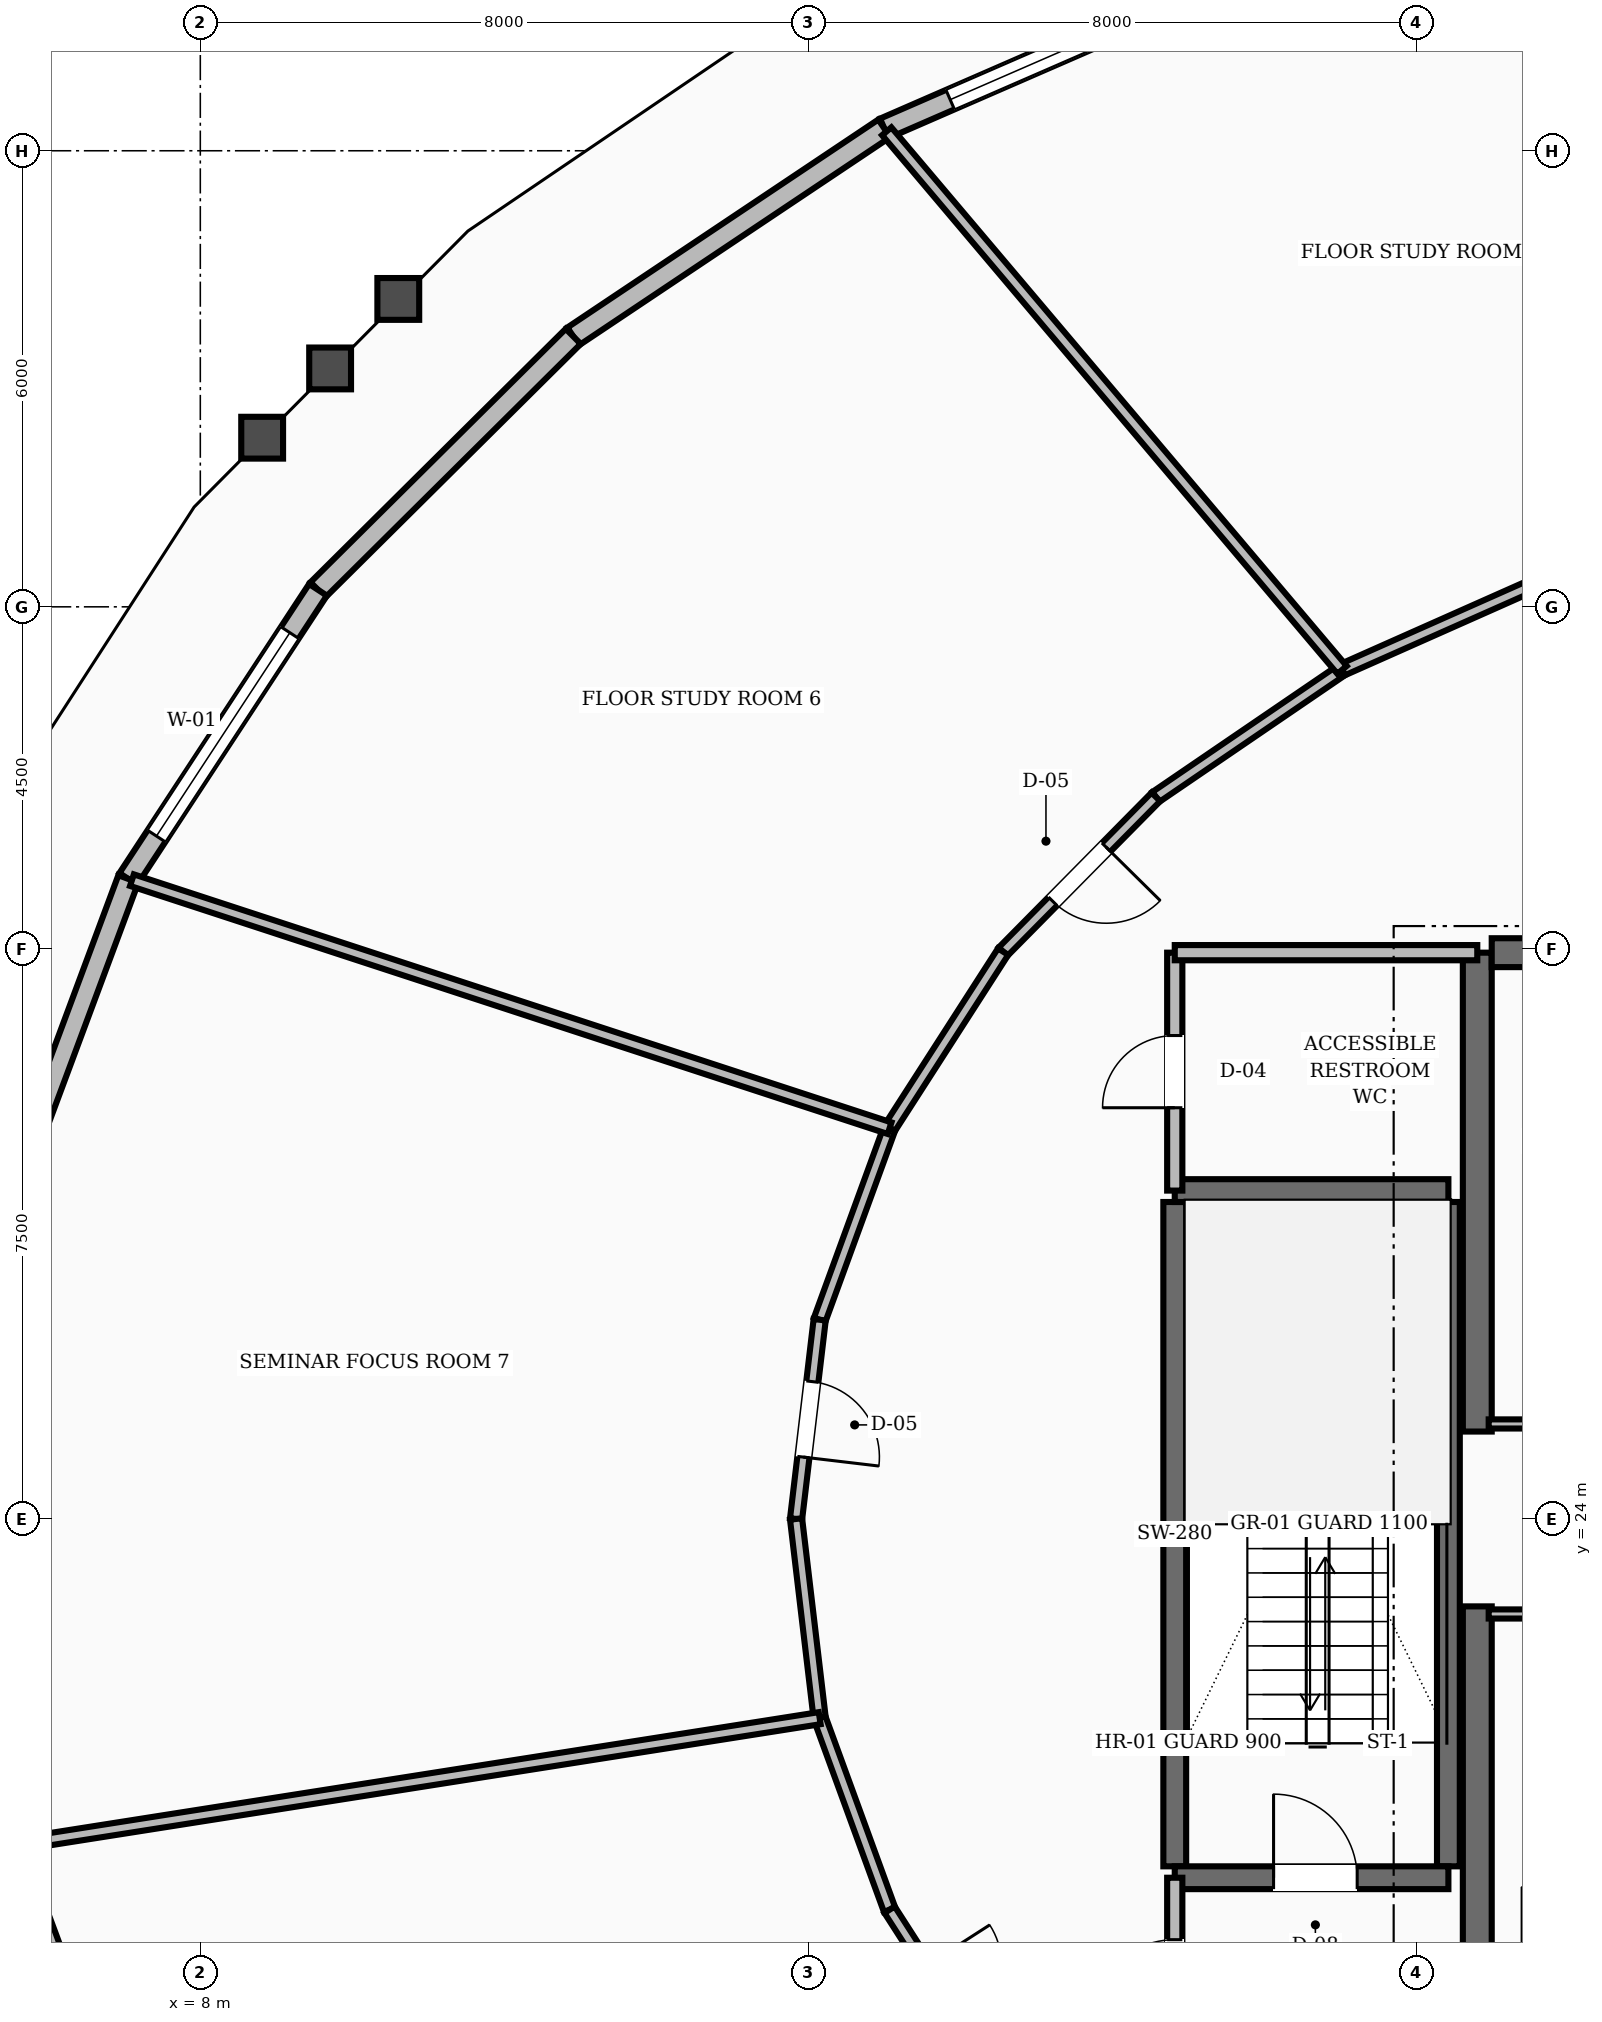
"""IFC4 building model, lengths in metres.
Left out: names, types, materials, properties, quantities, classifications, styles, units other than length and angle.
Written with IfcOpenShell. Run it as: python <this file> out.ifc"""

import sys

from ifc_helpers import new_model, si_unit, direction, frame, frame_2d, origin, place, context, subcontext, project, spatial, rectangle, extrude, element, fill, save


model = new_model("IFC4")
c1 = context("Model", 3, precision=1e-05, world=origin(), true_north=direction((0.0, 1.0)))
c2 = subcontext(c1, "Body", "Model", "MODEL_VIEW")
j1 = project(units=[si_unit("LENGTHUNIT", "METRE"), si_unit("PLANEANGLEUNIT", "RADIAN")], contexts=[c1])
p1 = place(None, origin())
s1 = spatial("IfcSite", under=j1, at=p1, CompositionType="ELEMENT")
p2 = place(p1, origin())
s2 = spatial("IfcBuilding", under=s1, at=p2, CompositionType="ELEMENT")
p3 = place(p2, frame((0.0, 0.0, 73.6)))
s3 = spatial("IfcBuildingStorey", under=s2, at=p3, CompositionType="ELEMENT", Elevation=73.6)
for number, where, z_axis, x_axis in (
    (1, (24.8, 16.55, 0.0), (0.0, 0.0, 1.0), (0.0, 1.0, 0.0)),
    (2, (24.8, 25.15, 0.0), (0.0, 0.0, 1.0), (0.0, 1.0, 0.0)),
):
    element("IfcWall", number, at=place(p3, frame(where, z_axis=z_axis, x_axis=x_axis)), inside=s3, PredefinedType="SHEAR", context=c2, shape_type="SweptSolid", body=[
        extrude(rectangle(XDim=6.3, YDim=0.38, at=frame_2d((3.15, 0.0))), origin(), (0.0, 0.0, 1.0), 3.6),
    ])
p4 = place(p3, frame((24.99, 31.45, 0.0), z_axis=(0.0, 0.0, 1.0), x_axis=(1.0, 0.0, 0.0)))
e3 = element("IfcWall", 3, at=p4, inside=s3, PredefinedType="SHEAR", context=c2, shape_type="SweptSolid", body=[
    extrude(rectangle(XDim=3.21, YDim=0.38, at=frame_2d((1.605, 0.0))), origin(), (0.0, 0.0, 1.0), 3.6),
])
for number, where, z_axis, x_axis in (
    (4, (20.82, 19.43, 0.0), (0.0, 0.0, 1.0), (0.0, 1.0, 0.0)),
    (5, (24.42, 19.43, 0.0), (0.0, 0.0, 1.0), (0.0, 1.0, 0.0)),
):
    element("IfcWall", number, at=place(p3, frame(where, z_axis=z_axis, x_axis=x_axis)), inside=s3, PredefinedType="SHEAR", context=c2, shape_type="SweptSolid", body=[
        extrude(rectangle(XDim=8.74, YDim=0.3, at=frame_2d((4.37, 0.0))), origin(), (0.0, 0.0, 1.0), 3.6),
    ])
p5 = place(p3, frame((20.82, 19.28, 0.0), z_axis=(0.0, 0.0, 1.0), x_axis=(1.0, 0.0, 0.0)))
e6 = element("IfcWall", 6, at=p5, inside=s3, PredefinedType="SHEAR", context=c2, shape_type="SweptSolid", body=[
    extrude(rectangle(XDim=3.6, YDim=0.3, at=frame_2d((1.8, 0.0))), origin(), (0.0, 0.0, 1.0), 3.6),
])
p6 = place(p5, frame((1.3, 0.0, 0.0)))
e7 = element("IfcOpeningElement", 7, at=p6, cuts=e6, PredefinedType="OPENING", context=c2, shape_type="SweptSolid", body=[
    extrude(rectangle(XDim=1.1, YDim=2.1, at=frame_2d((0.55, 1.05))), frame((0.0, 0.16, 0.0), z_axis=(0.0, -1.0, 0.0), x_axis=(1.0, 0.0, 0.0)), (0.0, 0.0, 1.0), 0.32),
])
p7 = place(p3, frame((20.82, 28.32, 0.0), z_axis=(0.0, 0.0, 1.0), x_axis=(1.0, 0.0, 0.0)))
e8 = element("IfcWall", 8, at=p7, inside=s3, PredefinedType="SHEAR", context=c2, shape_type="SweptSolid", body=[
    extrude(rectangle(XDim=3.6, YDim=0.3, at=frame_2d((1.8, 0.0))), origin(), (0.0, 0.0, 1.0), 3.6),
])
p8 = place(p3, frame((21.667, 44.328, 0.0), z_axis=(0.0, 0.0, 1.0), x_axis=(-0.916797710113, -0.39935192341, 0.0)))
e9 = element("IfcWall", 9, at=p8, inside=s3, PredefinedType="STANDARD", context=c2, shape_type="SweptSolid", body=[
    extrude(rectangle(XDim=5.092, YDim=0.28, at=frame_2d((2.546, 0.0))), origin(), (0.0, 0.0, 1.0), 2.71),
])
p9 = place(p8, frame((0.946, 0.0, 0.8)))
e10 = element("IfcOpeningElement", 10, at=p9, cuts=e9, PredefinedType="OPENING", context=c2, shape_type="SweptSolid", body=[
    extrude(rectangle(XDim=3.2, YDim=1.65, at=frame_2d((1.6, 0.825))), frame((0.0, 0.15, 0.0), z_axis=(0.0, -1.0, 0.0), x_axis=(1.0, 0.0, 0.0)), (0.0, 0.0, 1.0), 0.3),
])
p10 = place(p3, frame((16.998, 42.294, 0.0), z_axis=(0.0, 0.0, 1.0), x_axis=(-0.831278799502, -0.55585569845, 0.0)))
e11 = element("IfcWall", 11, at=p10, inside=s3, PredefinedType="STANDARD", context=c2, shape_type="SweptSolid", body=[
    extrude(rectangle(XDim=4.922, YDim=0.28, at=frame_2d((2.461, 0.0))), origin(), (0.0, 0.0, 1.0), 2.71),
])
p11 = place(p3, frame((12.906, 39.558, 0.0), z_axis=(0.0, 0.0, 1.0), x_axis=(-0.709630207161, -0.704574317645, 0.0)))
e12 = element("IfcWall", 12, at=p11, inside=s3, PredefinedType="STANDARD", context=c2, shape_type="SweptSolid", body=[
    extrude(rectangle(XDim=4.732, YDim=0.28, at=frame_2d((2.366, 0.0))), origin(), (0.0, 0.0, 1.0), 2.71),
])
p12 = place(p3, frame((9.548, 36.224, 0.0), z_axis=(0.0, 0.0, 1.0), x_axis=(-0.548505219405, -0.836147130765, 0.0)))
e13 = element("IfcWall", 13, at=p12, inside=s3, PredefinedType="STANDARD", context=c2, shape_type="SweptSolid", body=[
    extrude(rectangle(XDim=4.549, YDim=0.28, at=frame_2d((2.275, 0.0))), origin(), (0.0, 0.0, 1.0), 2.71),
])
p13 = place(p12, frame((0.675, 0.0, 0.8)))
e14 = element("IfcOpeningElement", 14, at=p13, cuts=e13, PredefinedType="OPENING", context=c2, shape_type="SweptSolid", body=[
    extrude(rectangle(XDim=3.2, YDim=1.65, at=frame_2d((1.6, 0.825))), frame((0.0, 0.15, 0.0), z_axis=(0.0, -1.0, 0.0), x_axis=(1.0, 0.0, 0.0)), (0.0, 0.0, 1.0), 0.3),
])
for number, where, z_axis, x_axis in (
    (15, (7.053, 32.42, 0.0), (0.0, 0.0, 1.0), (-0.349, -0.937, 0.0)),
    (16, (5.516, 19.708, 0.0), (0.0, 0.0, 1.0), (0.349, -0.937, 0.0)),
):
    element("IfcWall", number, at=place(p3, frame(where, z_axis=z_axis, x_axis=x_axis)), inside=s3, PredefinedType="STANDARD", context=c2, shape_type="SweptSolid", body=[
        extrude(rectangle(XDim=4.404, YDim=0.28, at=frame_2d((2.202, 0.0))), origin(), (0.0, 0.0, 1.0), 2.71),
    ])
p14 = place(p3, frame((20.82, 16.55, 0.0), z_axis=(0.0, 0.0, 1.0), x_axis=(0.0, 1.0, 0.0)))
e17 = element("IfcWall", 17, at=p14, inside=s3, PredefinedType="SOLIDWALL", context=c2, shape_type="SweptSolid", body=[
    extrude(rectangle(XDim=2.73, YDim=0.2, at=frame_2d((1.365, 0.0))), origin(), (0.0, 0.0, 1.0), 2.71),
])
p15 = place(p14, frame((0.815, 0.0, 0.0)))
e18 = element("IfcOpeningElement", 18, at=p15, cuts=e17, PredefinedType="OPENING", context=c2, shape_type="SweptSolid", body=[
    extrude(rectangle(XDim=1.1, YDim=2.1, at=frame_2d((0.55, 1.05))), frame((0.0, 0.11, 0.0), z_axis=(0.0, -1.0, 0.0), x_axis=(1.0, 0.0, 0.0)), (0.0, 0.0, 1.0), 0.22),
])
p16 = place(p3, frame((20.82, 28.32, 0.0), z_axis=(0.0, 0.0, 1.0), x_axis=(0.0, 1.0, 0.0)))
e19 = element("IfcWall", 19, at=p16, inside=s3, PredefinedType="SOLIDWALL", context=c2, shape_type="SweptSolid", body=[
    extrude(rectangle(XDim=3.13, YDim=0.2, at=frame_2d((1.565, 0.0))), origin(), (0.0, 0.0, 1.0), 2.71),
])
p17 = place(p16, frame((1.09, 0.0, 0.0)))
e20 = element("IfcOpeningElement", 20, at=p17, cuts=e19, PredefinedType="OPENING", context=c2, shape_type="SweptSolid", body=[
    extrude(rectangle(XDim=0.95, YDim=2.1, at=frame_2d((0.475, 1.05))), frame((0.0, 0.11, 0.0), z_axis=(0.0, -1.0, 0.0), x_axis=(1.0, 0.0, 0.0)), (0.0, 0.0, 1.0), 0.22),
])
p18 = place(p3, frame((20.82, 31.45, 0.0), z_axis=(0.0, 0.0, 1.0), x_axis=(1.0, 0.0, 0.0)))
e21 = element("IfcWall", 21, at=p18, inside=s3, PredefinedType="SOLIDWALL", context=c2, shape_type="SweptSolid", body=[
    extrude(rectangle(XDim=3.98, YDim=0.2, at=frame_2d((1.99, 0.0))), origin(), (0.0, 0.0, 1.0), 2.71),
])
p19 = place(p3, frame((24.95, 25.25, 0.0), z_axis=(0.0, 0.0, 1.0), x_axis=(1.0, 0.0, 0.0)))
e22 = element("IfcWall", 22, at=p19, inside=s3, PredefinedType="PARTITIONING", context=c2, shape_type="SweptSolid", body=[
    extrude(rectangle(XDim=3.2, YDim=0.12, at=frame_2d((1.6, 0.0))), origin(), (0.0, 0.0, 1.0), 2.71),
])
p20 = place(p19, frame((1.125, 0.0, 0.0)))
e23 = element("IfcOpeningElement", 23, at=p20, cuts=e22, PredefinedType="OPENING", context=c2, shape_type="SweptSolid", body=[
    extrude(rectangle(XDim=0.95, YDim=2.1, at=frame_2d((0.475, 1.05))), frame((0.0, 0.07, 0.0), z_axis=(0.0, -1.0, 0.0), x_axis=(1.0, 0.0, 0.0)), (0.0, 0.0, 1.0), 0.14),
])
p21 = place(p3, frame((24.95, 22.75, 0.0), z_axis=(0.0, 0.0, 1.0), x_axis=(1.0, 0.0, 0.0)))
e24 = element("IfcWall", 24, at=p21, inside=s3, PredefinedType="PARTITIONING", context=c2, shape_type="SweptSolid", body=[
    extrude(rectangle(XDim=3.2, YDim=0.12, at=frame_2d((1.6, 0.0))), origin(), (0.0, 0.0, 1.0), 2.71),
])
p22 = place(p21, frame((1.125, 0.0, 0.0)))
e25 = element("IfcOpeningElement", 25, at=p22, cuts=e24, PredefinedType="OPENING", context=c2, shape_type="SweptSolid", body=[
    extrude(rectangle(XDim=0.95, YDim=2.1, at=frame_2d((0.475, 1.05))), frame((0.0, 0.07, 0.0), z_axis=(0.0, -1.0, 0.0), x_axis=(1.0, 0.0, 0.0)), (0.0, 0.0, 1.0), 0.14),
])
p23 = place(p3, frame((25.815, 36.411, 0.0), z_axis=(0.0, 0.0, 1.0), x_axis=(-0.913860932409, -0.406027334321, 0.0)))
e26 = element("IfcWall", 26, at=p23, inside=s3, PredefinedType="SOLIDWALL", context=c2, shape_type="SweptSolid", body=[
    extrude(rectangle(XDim=3.058, YDim=0.16, at=frame_2d((1.529, 0.0))), origin(), (0.0, 0.0, 1.0), 2.71),
])
p24 = place(p3, frame((23.021, 35.17, 0.0), z_axis=(0.0, 0.0, 1.0), x_axis=(-0.826112340767, -0.563505457323, 0.0)))
e27 = element("IfcWall", 27, at=p24, inside=s3, PredefinedType="SOLIDWALL", context=c2, shape_type="SweptSolid", body=[
    extrude(rectangle(XDim=2.965, YDim=0.16, at=frame_2d((1.482, 0.0))), origin(), (0.0, 0.0, 1.0), 2.71),
])
p25 = place(p3, frame((20.572, 33.499, 0.0), z_axis=(0.0, 0.0, 1.0), x_axis=(-0.702569520063, -0.711615113301, 0.0)))
e28 = element("IfcWall", 28, at=p25, inside=s3, PredefinedType="SOLIDWALL", context=c2, shape_type="SweptSolid", body=[
    extrude(rectangle(XDim=2.861, YDim=0.16, at=frame_2d((1.43, 0.0))), origin(), (0.0, 0.0, 1.0), 2.71),
])
p26 = place(p25, frame((0.93, 0.0, 0.0)))
e29 = element("IfcOpeningElement", 29, at=p26, cuts=e28, PredefinedType="OPENING", context=c2, shape_type="SweptSolid", body=[
    extrude(rectangle(XDim=1.0, YDim=2.1, at=frame_2d((0.5, 1.05))), frame((0.0, 0.09, 0.0), z_axis=(0.0, -1.0, 0.0), x_axis=(1.0, 0.0, 0.0)), (0.0, 0.0, 1.0), 0.18),
])
p27 = place(p3, frame((18.562, 31.463, 0.0), z_axis=(0.0, 0.0, 1.0), x_axis=(-0.540891657444, -0.841092274907, 0.0)))
e30 = element("IfcWall", 30, at=p27, inside=s3, PredefinedType="SOLIDWALL", context=c2, shape_type="SweptSolid", body=[
    extrude(rectangle(XDim=2.761, YDim=0.16, at=frame_2d((1.38, 0.0))), origin(), (0.0, 0.0, 1.0), 2.71),
])
p28 = place(p3, frame((17.068, 29.141, 0.0), z_axis=(0.0, 0.0, 1.0), x_axis=(-0.342882618672, -0.939378257047, 0.0)))
e31 = element("IfcWall", 31, at=p28, inside=s3, PredefinedType="SOLIDWALL", context=c2, shape_type="SweptSolid", body=[
    extrude(rectangle(XDim=2.683, YDim=0.16, at=frame_2d((1.341, 0.0))), origin(), (0.0, 0.0, 1.0), 2.71),
])
p29 = place(p3, frame((16.148, 26.621, 0.0), z_axis=(0.0, 0.0, 1.0), x_axis=(-0.117667763342, -0.993053018459, 0.0)))
e32 = element("IfcWall", 32, at=p29, inside=s3, PredefinedType="SOLIDWALL", context=c2, shape_type="SweptSolid", body=[
    extrude(rectangle(XDim=2.639, YDim=0.16, at=frame_2d((1.32, 0.0))), origin(), (0.0, 0.0, 1.0), 2.71),
])
p30 = place(p29, frame((0.82, 0.0, 0.0)))
e33 = element("IfcOpeningElement", 33, at=p30, cuts=e32, PredefinedType="OPENING", context=c2, shape_type="SweptSolid", body=[
    extrude(rectangle(XDim=1.0, YDim=2.1, at=frame_2d((0.5, 1.05))), frame((0.0, 0.09, 0.0), z_axis=(0.0, -1.0, 0.0), x_axis=(1.0, 0.0, 0.0)), (0.0, 0.0, 1.0), 0.18),
])
p31 = place(p3, frame((15.838, 24.0, 0.0), z_axis=(0.0, 0.0, 1.0), x_axis=(0.117667763342, -0.993053018459, 0.0)))
e34 = element("IfcWall", 34, at=p31, inside=s3, PredefinedType="SOLIDWALL", context=c2, shape_type="SweptSolid", body=[
    extrude(rectangle(XDim=2.639, YDim=0.16, at=frame_2d((1.32, 0.0))), origin(), (0.0, 0.0, 1.0), 2.71),
])
p32 = place(p3, frame((16.148, 21.379, 0.0), z_axis=(0.0, 0.0, 1.0), x_axis=(0.342882618672, -0.939378257047, 0.0)))
e35 = element("IfcWall", 35, at=p32, inside=s3, PredefinedType="SOLIDWALL", context=c2, shape_type="SweptSolid", body=[
    extrude(rectangle(XDim=2.683, YDim=0.16, at=frame_2d((1.341, 0.0))), origin(), (0.0, 0.0, 1.0), 2.71),
])
p33 = place(p3, frame((17.068, 18.859, 0.0), z_axis=(0.0, 0.0, 1.0), x_axis=(0.540891657444, -0.841092274907, 0.0)))
e36 = element("IfcWall", 36, at=p33, inside=s3, PredefinedType="SOLIDWALL", context=c2, shape_type="SweptSolid", body=[
    extrude(rectangle(XDim=2.761, YDim=0.16, at=frame_2d((1.38, 0.0))), origin(), (0.0, 0.0, 1.0), 2.71),
])
p34 = place(p33, frame((0.881, 0.0, 0.0)))
e37 = element("IfcOpeningElement", 37, at=p34, cuts=e36, PredefinedType="OPENING", context=c2, shape_type="SweptSolid", body=[
    extrude(rectangle(XDim=1.0, YDim=2.1, at=frame_2d((0.5, 1.05))), frame((0.0, 0.09, 0.0), z_axis=(0.0, -1.0, 0.0), x_axis=(1.0, 0.0, 0.0)), (0.0, 0.0, 1.0), 0.18),
])
p35 = place(p3, frame((23.021, 35.17, 0.0), z_axis=(0.0, 0.0, 1.0), x_axis=(-0.645595412699, 0.763679620719, 0.0)))
e38 = element("IfcWall", 38, at=p35, inside=s3, PredefinedType="SOLIDWALL", context=c2, shape_type="SweptSolid", body=[
    extrude(rectangle(XDim=9.279, YDim=0.16, at=frame_2d((4.64, 0.0))), origin(), (0.0, 0.0, 1.0), 2.71),
])
p36 = place(p3, frame((17.068, 29.141, 0.0), z_axis=(0.0, 0.0, 1.0), x_axis=(-0.950368850296, 0.31112545442, 0.0)))
e39 = element("IfcWall", 39, at=p36, inside=s3, PredefinedType="SOLIDWALL", context=c2, shape_type="SweptSolid", body=[
    extrude(rectangle(XDim=10.488, YDim=0.16, at=frame_2d((5.244, 0.0))), origin(), (0.0, 0.0, 1.0), 2.71),
])
p37 = place(p3, frame((16.148, 21.379, 0.0), z_axis=(0.0, 0.0, 1.0), x_axis=(-0.987864939739, -0.155315359302, 0.0)))
e40 = element("IfcWall", 40, at=p37, inside=s3, PredefinedType="SOLIDWALL", context=c2, shape_type="SweptSolid", body=[
    extrude(rectangle(XDim=10.712, YDim=0.16, at=frame_2d((5.356, 0.0))), origin(), (0.0, 0.0, 1.0), 2.71),
])
p38 = place(p9, origin())
e41 = element("IfcWindow", 41, at=p38, inside=s3, PartitioningType="SINGLE_PANEL", PredefinedType="WINDOW", context=c2, shape_type="SweptSolid", body=[
    extrude(rectangle(XDim=3.2, YDim=1.65, at=frame_2d((1.6, 0.825))), frame((0.0, 0.03, 0.0), z_axis=(0.0, -1.0, 0.0), x_axis=(1.0, 0.0, 0.0)), (0.0, 0.0, 1.0), 0.06),
])
fill(e10, e41)
p39 = place(p13, origin())
e42 = element("IfcWindow", 42, at=p39, inside=s3, PartitioningType="SINGLE_PANEL", PredefinedType="WINDOW", context=c2, shape_type="SweptSolid", body=[
    extrude(rectangle(XDim=3.2, YDim=1.65, at=frame_2d((1.6, 0.825))), frame((0.0, 0.03, 0.0), z_axis=(0.0, -1.0, 0.0), x_axis=(1.0, 0.0, 0.0)), (0.0, 0.0, 1.0), 0.06),
])
fill(e14, e42)
p40 = place(p6, origin())
e43 = element("IfcDoor", 43, at=p40, inside=s3, OperationType="SINGLE_SWING_LEFT", PredefinedType="DOOR", context=c2, shape_type="SweptSolid", body=[
    extrude(rectangle(XDim=1.1, YDim=2.1, at=frame_2d((0.55, 1.05))), frame((0.0, 0.025, 0.0), z_axis=(0.0, -1.0, 0.0), x_axis=(1.0, 0.0, 0.0)), (0.0, 0.0, 1.0), 0.05),
])
fill(e7, e43)
p41 = place(p15, origin())
e44 = element("IfcDoor", 44, at=p41, inside=s3, OperationType="SINGLE_SWING_LEFT", PredefinedType="DOOR", context=c2, shape_type="SweptSolid", body=[
    extrude(rectangle(XDim=1.1, YDim=2.1, at=frame_2d((0.55, 1.05))), frame((0.0, 0.025, 0.0), z_axis=(0.0, -1.0, 0.0), x_axis=(1.0, 0.0, 0.0)), (0.0, 0.0, 1.0), 0.05),
])
fill(e18, e44)
p42 = place(p17, origin())
e45 = element("IfcDoor", 45, at=p42, inside=s3, OperationType="SINGLE_SWING_LEFT", PredefinedType="DOOR", context=c2, shape_type="SweptSolid", body=[
    extrude(rectangle(XDim=0.95, YDim=2.1, at=frame_2d((0.475, 1.05))), frame((0.0, 0.025, 0.0), z_axis=(0.0, -1.0, 0.0), x_axis=(1.0, 0.0, 0.0)), (0.0, 0.0, 1.0), 0.05),
])
fill(e20, e45)
p43 = place(p26, origin())
e46 = element("IfcDoor", 46, at=p43, inside=s3, OperationType="SINGLE_SWING_LEFT", PredefinedType="DOOR", context=c2, shape_type="SweptSolid", body=[
    extrude(rectangle(XDim=1.0, YDim=2.1, at=frame_2d((0.5, 1.05))), frame((0.0, 0.025, 0.0), z_axis=(0.0, -1.0, 0.0), x_axis=(1.0, 0.0, 0.0)), (0.0, 0.0, 1.0), 0.05),
])
fill(e29, e46)
p44 = place(p30, origin())
e47 = element("IfcDoor", 47, at=p44, inside=s3, OperationType="SINGLE_SWING_RIGHT", PredefinedType="DOOR", context=c2, shape_type="SweptSolid", body=[
    extrude(rectangle(XDim=1.0, YDim=2.1, at=frame_2d((0.5, 1.05))), frame((0.0, 0.025, 0.0), z_axis=(0.0, -1.0, 0.0), x_axis=(1.0, 0.0, 0.0)), (0.0, 0.0, 1.0), 0.05),
])
fill(e33, e47)
save(model, sys.argv[1])
